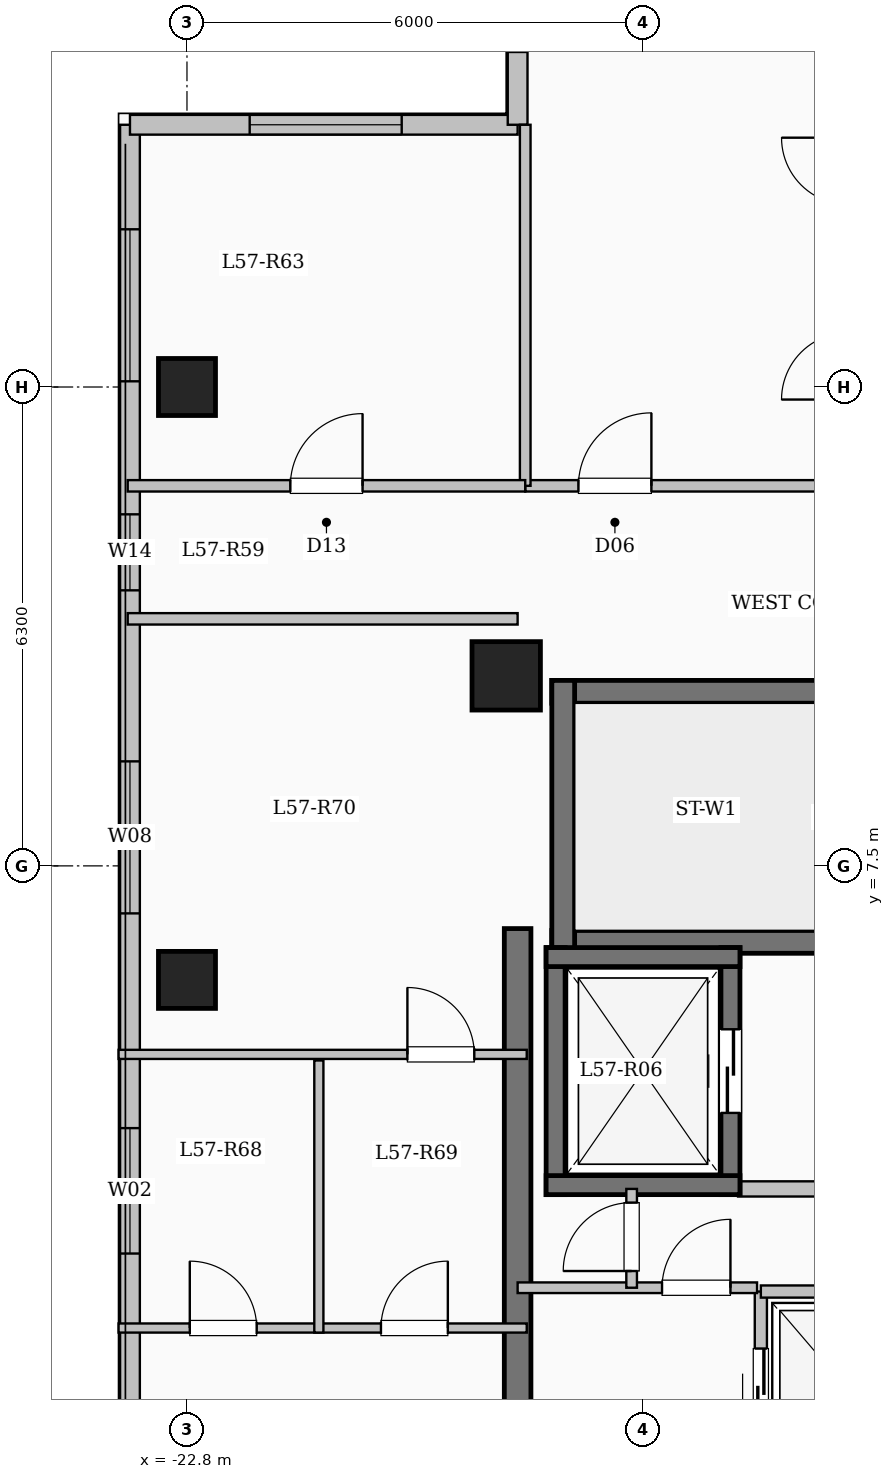
"""IFC4 building model, lengths in metres.
Left out: names, types, materials, properties, quantities, classifications, styles, units other than length and angle.
Written with IfcOpenShell. Run it as: python <this file> out.ifc"""

import sys

from ifc_helpers import new_model, si_unit, direction, frame, frame_2d, origin, origin_2d, place, context, subcontext, project, spatial, rectangle, extrude, element, fill, save


model = new_model("IFC4")
c1 = context("Model", 3, precision=1e-05, world=origin(), true_north=direction((0.0, 1.0)))
c2 = subcontext(c1, "Body", "Model", "MODEL_VIEW")
j1 = project(units=[si_unit("LENGTHUNIT", "METRE"), si_unit("PLANEANGLEUNIT", "RADIAN")], contexts=[c1])
p1 = place(None, origin())
s1 = spatial("IfcSite", under=j1, at=p1, CompositionType="ELEMENT")
p2 = place(p1, origin())
s2 = spatial("IfcBuilding", under=s1, at=p2, CompositionType="ELEMENT")
p3 = place(p2, frame((0.0, 0.0, 210.35)))
s3 = spatial("IfcBuildingStorey", under=s2, at=p3, CompositionType="ELEMENT", Elevation=210.35)
p4 = place(p3, frame((-18.6, 10.0, 0.0), z_axis=(0.0, 0.0, 1.0), x_axis=(1.0, 0.0, 0.0)))
e1 = element("IfcColumn", 1, at=p4, inside=s3, PredefinedType="COLUMN", context=c2, shape_type="SweptSolid", body=[
    extrude(rectangle(XDim=0.9, YDim=0.9, at=origin_2d()), origin(), (0.0, 0.0, 1.0), 3.35),
])
for number, where, z_axis, x_axis in (
    (2, (-22.8, 6.0, 0.0), (0.0, 0.0, 1.0), (1.0, 0.0, 0.0)),
    (3, (-22.8, 13.8, 0.0), (0.0, 0.0, 1.0), (1.0, 0.0, 0.0)),
):
    element("IfcColumn", number, at=place(p3, frame(where, z_axis=z_axis, x_axis=x_axis)), inside=s3, PredefinedType="COLUMN", context=c2, shape_type="SweptSolid", body=[
        extrude(rectangle(XDim=0.75, YDim=0.75, at=origin_2d()), origin(), (0.0, 0.0, 1.0), 3.35),
    ])
p5 = place(p3, frame((-23.55, -17.25, 0.0), z_axis=(0.0, 0.0, 1.0), x_axis=(0.0, 1.0, 0.0)))
e4 = element("IfcWall", 4, at=p5, inside=s3, PredefinedType="SOLIDWALL", context=c2, shape_type="SweptSolid", body=[
    extrude(rectangle(XDim=34.5, YDim=0.26, at=frame_2d((17.25, 0.0))), origin(), (0.0, 0.0, 1.0), 3.1),
])
p6 = place(p5, frame((2.825, 0.0, 0.9)))
e5 = element("IfcOpeningElement", 5, at=p6, cuts=e4, PredefinedType="OPENING", context=c2, shape_type="SweptSolid", body=[
    extrude(rectangle(XDim=2.2, YDim=1.75, at=frame_2d((1.1, 0.875))), frame((0.0, 0.14, 0.0), z_axis=(0.0, -1.0, 0.0), x_axis=(1.0, 0.0, 0.0)), (0.0, 0.0, 1.0), 0.28),
])
p7 = place(p5, frame((8.325, 0.0, 0.95)))
e6 = element("IfcOpeningElement", 6, at=p7, cuts=e4, PredefinedType="OPENING", context=c2, shape_type="SweptSolid", body=[
    extrude(rectangle(XDim=1.2, YDim=1.5, at=frame_2d((0.6, 0.75))), frame((0.0, 0.14, 0.0), z_axis=(0.0, -1.0, 0.0), x_axis=(1.0, 0.0, 0.0)), (0.0, 0.0, 1.0), 0.28),
])
p8 = place(p5, frame((13.25, 0.0, 0.9)))
e7 = element("IfcOpeningElement", 7, at=p8, cuts=e4, PredefinedType="OPENING", context=c2, shape_type="SweptSolid", body=[
    extrude(rectangle(XDim=2.2, YDim=1.75, at=frame_2d((1.1, 0.875))), frame((0.0, 0.14, 0.0), z_axis=(0.0, -1.0, 0.0), x_axis=(1.0, 0.0, 0.0)), (0.0, 0.0, 1.0), 0.28),
])
p9 = place(p5, frame((19.65, 0.0, 0.9)))
e8 = element("IfcOpeningElement", 8, at=p9, cuts=e4, PredefinedType="OPENING", context=c2, shape_type="SweptSolid", body=[
    extrude(rectangle(XDim=1.65, YDim=1.6, at=frame_2d((0.825, 0.8))), frame((0.0, 0.14, 0.0), z_axis=(0.0, -1.0, 0.0), x_axis=(1.0, 0.0, 0.0)), (0.0, 0.0, 1.0), 0.28),
])
p10 = place(p5, frame((24.125, 0.0, 0.9)))
e9 = element("IfcOpeningElement", 9, at=p10, cuts=e4, PredefinedType="OPENING", context=c2, shape_type="SweptSolid", body=[
    extrude(rectangle(XDim=2.0, YDim=1.7, at=frame_2d((1.0, 0.85))), frame((0.0, 0.14, 0.0), z_axis=(0.0, -1.0, 0.0), x_axis=(1.0, 0.0, 0.0)), (0.0, 0.0, 1.0), 0.28),
])
p11 = place(p5, frame((28.375, 0.0, 0.95)))
e10 = element("IfcOpeningElement", 10, at=p11, cuts=e4, PredefinedType="OPENING", context=c2, shape_type="SweptSolid", body=[
    extrude(rectangle(XDim=1.0, YDim=1.5, at=frame_2d((0.5, 0.75))), frame((0.0, 0.14, 0.0), z_axis=(0.0, -1.0, 0.0), x_axis=(1.0, 0.0, 0.0)), (0.0, 0.0, 1.0), 0.28),
])
p12 = place(p5, frame((31.125, 0.0, 0.9)))
e11 = element("IfcOpeningElement", 11, at=p12, cuts=e4, PredefinedType="OPENING", context=c2, shape_type="SweptSolid", body=[
    extrude(rectangle(XDim=2.0, YDim=1.7, at=frame_2d((1.0, 0.85))), frame((0.0, 0.14, 0.0), z_axis=(0.0, -1.0, 0.0), x_axis=(1.0, 0.0, 0.0)), (0.0, 0.0, 1.0), 0.28),
])
p13 = place(p3, frame((-23.55, 17.25, 0.0), z_axis=(0.0, 0.0, 1.0), x_axis=(1.0, 0.0, 0.0)))
e12 = element("IfcWall", 12, at=p13, inside=s3, PredefinedType="SOLIDWALL", context=c2, shape_type="SweptSolid", body=[
    extrude(rectangle(XDim=5.1, YDim=0.26, at=frame_2d((2.55, 0.0))), origin(), (0.0, 0.0, 1.0), 3.1),
])
p14 = place(p13, frame((1.575, 0.0, 0.9)))
e13 = element("IfcOpeningElement", 13, at=p14, cuts=e12, PredefinedType="OPENING", context=c2, shape_type="SweptSolid", body=[
    extrude(rectangle(XDim=2.0, YDim=1.7, at=frame_2d((1.0, 0.85))), frame((0.0, 0.14, 0.0), z_axis=(0.0, -1.0, 0.0), x_axis=(1.0, 0.0, 0.0)), (0.0, 0.0, 1.0), 0.28),
])
p15 = place(p3, frame((-18.45, 17.25, 0.0), z_axis=(0.0, 0.0, 1.0), x_axis=(0.0, 1.0, 0.0)))
e14 = element("IfcWall", 14, at=p15, inside=s3, PredefinedType="SOLIDWALL", context=c2, shape_type="SweptSolid", body=[
    extrude(rectangle(XDim=3.6, YDim=0.26, at=frame_2d((1.8, 0.0))), origin(), (0.0, 0.0, 1.0), 3.1),
])
p16 = place(p15, frame((0.958, 0.0, 0.9)))
e15 = element("IfcOpeningElement", 15, at=p16, cuts=e14, PredefinedType="OPENING", context=c2, shape_type="SweptSolid", body=[
    extrude(rectangle(XDim=1.65, YDim=1.6, at=frame_2d((0.825, 0.8))), frame((0.0, 0.14, 0.0), z_axis=(0.0, -1.0, 0.0), x_axis=(1.0, 0.0, 0.0)), (0.0, 0.0, 1.0), 0.28),
])
p17 = place(p3, frame((-18.0, 9.79, 0.0), z_axis=(0.0, 0.0, 1.0), x_axis=(1.0, 0.0, 0.0)))
e16 = element("IfcWall", 16, at=p17, inside=s3, PredefinedType="SHEAR", context=c2, shape_type="SweptSolid", body=[
    extrude(rectangle(XDim=8.0, YDim=0.3, at=frame_2d((4.0, 0.0))), origin(), (0.0, 0.0, 1.0), 3.35),
])
p18 = place(p3, frame((-18.0, 6.5, 0.0), z_axis=(0.0, 0.0, 1.0), x_axis=(1.0, 0.0, 0.0)))
e17 = element("IfcWall", 17, at=p18, inside=s3, PredefinedType="SHEAR", context=c2, shape_type="SweptSolid", body=[
    extrude(rectangle(XDim=8.0, YDim=0.3, at=frame_2d((4.0, 0.0))), origin(), (0.0, 0.0, 1.0), 3.35),
])
p19 = place(p18, frame((6.45, 0.0, 0.0)))
e18 = element("IfcOpeningElement", 18, at=p19, cuts=e17, PredefinedType="OPENING", context=c2, shape_type="SweptSolid", body=[
    extrude(rectangle(XDim=1.0, YDim=2.15, at=frame_2d((0.5, 1.075))), frame((0.0, 0.16, 0.0), z_axis=(0.0, -1.0, 0.0), x_axis=(1.0, 0.0, 0.0)), (0.0, 0.0, 1.0), 0.32),
])
p20 = place(p3, frame((-17.85, 6.35, 0.0), z_axis=(0.0, 0.0, 1.0), x_axis=(0.0, 1.0, 0.0)))
e19 = element("IfcWall", 19, at=p20, inside=s3, PredefinedType="SHEAR", context=c2, shape_type="SweptSolid", body=[
    extrude(rectangle(XDim=3.59, YDim=0.3, at=frame_2d((1.795, 0.0))), origin(), (0.0, 0.0, 1.0), 3.35),
])
p21 = place(p3, frame((-15.55, 3.25, 0.0), z_axis=(0.0, 0.0, 1.0), x_axis=(1.0, 0.0, 0.0)))
e20 = element("IfcWall", 20, at=p21, inside=s3, PredefinedType="SOLIDWALL", context=c2, shape_type="SweptSolid", body=[
    extrude(rectangle(XDim=5.4, YDim=0.2, at=frame_2d((2.7, 0.0))), origin(), (0.0, 0.0, 1.0), 3.1),
])
p22 = place(p3, frame((-17.95, 3.175, 0.0), z_axis=(0.0, 0.0, 1.0), x_axis=(0.0, 1.0, 0.0)))
e21 = element("IfcWall", 21, at=p22, inside=s3, PredefinedType="SHEAR", context=c2, shape_type="SweptSolid", body=[
    extrude(rectangle(XDim=3.25, YDim=0.25, at=frame_2d((1.625, 0.0))), origin(), (0.0, 0.0, 1.0), 3.35),
])
p23 = place(p3, frame((-15.65, 3.175, 0.0), z_axis=(0.0, 0.0, 1.0), x_axis=(0.0, 1.0, 0.0)))
e22 = element("IfcWall", 22, at=p23, inside=s3, PredefinedType="SHEAR", context=c2, shape_type="SweptSolid", body=[
    extrude(rectangle(XDim=3.25, YDim=0.25, at=frame_2d((1.625, 0.0))), origin(), (0.0, 0.0, 1.0), 3.35),
])
p24 = place(p23, frame((1.075, 0.0, 0.0)))
e23 = element("IfcOpeningElement", 23, at=p24, cuts=e22, PredefinedType="OPENING", context=c2, shape_type="SweptSolid", body=[
    extrude(rectangle(XDim=1.1, YDim=2.15, at=frame_2d((0.55, 1.075))), frame((0.0, 0.135, 0.0), z_axis=(0.0, -1.0, 0.0), x_axis=(1.0, 0.0, 0.0)), (0.0, 0.0, 1.0), 0.27),
])
for number, where, z_axis, x_axis in (
    (24, (-18.075, 3.3, 0.0), (0.0, 0.0, 1.0), (1.0, 0.0, 0.0)),
    (25, (-18.075, 6.3, 0.0), (0.0, 0.0, 1.0), (1.0, 0.0, 0.0)),
):
    element("IfcWall", number, at=place(p3, frame(where, z_axis=z_axis, x_axis=x_axis)), inside=s3, PredefinedType="SHEAR", context=c2, shape_type="SweptSolid", body=[
        extrude(rectangle(XDim=2.55, YDim=0.25, at=frame_2d((1.275, 0.0))), origin(), (0.0, 0.0, 1.0), 3.35),
    ])
p25 = place(p3, frame((-15.25, -0.7, 0.0), z_axis=(0.0, 0.0, 1.0), x_axis=(0.0, 1.0, 0.0)))
e26 = element("IfcWall", 26, at=p25, inside=s3, PredefinedType="SOLIDWALL", context=c2, shape_type="SweptSolid", body=[
    extrude(rectangle(XDim=2.6, YDim=0.16, at=frame_2d((1.3, 0.0))), origin(), (0.0, 0.0, 1.0), 3.1),
])
p26 = place(p25, frame((0.75, 0.0, 0.0)))
e27 = element("IfcOpeningElement", 27, at=p26, cuts=e26, PredefinedType="OPENING", context=c2, shape_type="SweptSolid", body=[
    extrude(rectangle(XDim=1.1, YDim=2.15, at=frame_2d((0.55, 1.075))), frame((0.0, 0.09, 0.0), z_axis=(0.0, -1.0, 0.0), x_axis=(1.0, 0.0, 0.0)), (0.0, 0.0, 1.0), 0.18),
])
p27 = place(p3, frame((-15.25, 1.9, 0.0), z_axis=(0.0, 0.0, 1.0), x_axis=(1.0, 0.0, 0.0)))
e28 = element("IfcWall", 28, at=p27, inside=s3, PredefinedType="SOLIDWALL", context=c2, shape_type="SweptSolid", body=[
    extrude(rectangle(XDim=2.3, YDim=0.16, at=frame_2d((1.15, 0.0))), origin(), (0.0, 0.0, 1.0), 3.1),
])
p28 = place(p3, frame((-18.45, -7.375, 0.0), z_axis=(0.0, 0.0, 1.0), x_axis=(0.0, 1.0, 0.0)))
e29 = element("IfcWall", 29, at=p28, inside=s3, PredefinedType="SHEAR", context=c2, shape_type="SweptSolid", body=[
    extrude(rectangle(XDim=14.05, YDim=0.35, at=frame_2d((7.025, 0.0))), origin(), (0.0, 0.0, 1.0), 3.35),
])
p29 = place(p3, frame((-18.45, 1.95, 0.0), z_axis=(0.0, 0.0, 1.0), x_axis=(1.0, 0.0, 0.0)))
e30 = element("IfcWall", 30, at=p29, inside=s3, PredefinedType="PARTITIONING", context=c2, shape_type="SweptSolid", body=[
    extrude(rectangle(XDim=3.15, YDim=0.14, at=frame_2d((1.575, 0.0))), origin(), (0.0, 0.0, 1.0), 3.1),
])
p30 = place(p29, frame((1.9, 0.0, 0.0)))
e31 = element("IfcOpeningElement", 31, at=p30, cuts=e30, PredefinedType="OPENING", context=c2, shape_type="SweptSolid", body=[
    extrude(rectangle(XDim=0.9, YDim=2.08, at=frame_2d((0.45, 1.04))), frame((0.0, 0.08, 0.0), z_axis=(0.0, -1.0, 0.0), x_axis=(1.0, 0.0, 0.0)), (0.0, 0.0, 1.0), 0.16),
])
p31 = place(p3, frame((-16.95, 1.95, 0.0), z_axis=(0.0, 0.0, 1.0), x_axis=(0.0, 1.0, 0.0)))
e32 = element("IfcWall", 32, at=p31, inside=s3, PredefinedType="PARTITIONING", context=c2, shape_type="SweptSolid", body=[
    extrude(rectangle(XDim=1.3, YDim=0.14, at=frame_2d((0.65, 0.0))), origin(), (0.0, 0.0, 1.0), 3.1),
])
p32 = place(p31, frame((0.22, 0.0, 0.0)))
e33 = element("IfcOpeningElement", 33, at=p32, cuts=e32, PredefinedType="OPENING", context=c2, shape_type="SweptSolid", body=[
    extrude(rectangle(XDim=0.9, YDim=2.08, at=frame_2d((0.45, 1.04))), frame((0.0, 0.08, 0.0), z_axis=(0.0, -1.0, 0.0), x_axis=(1.0, 0.0, 0.0)), (0.0, 0.0, 1.0), 0.16),
])
p33 = place(p3, frame((-18.35, 12.5, 0.0), z_axis=(0.0, 0.0, 1.0), x_axis=(1.0, 0.0, 0.0)))
e34 = element("IfcWall", 34, at=p33, inside=s3, PredefinedType="PARTITIONING", context=c2, shape_type="SweptSolid", body=[
    extrude(rectangle(XDim=14.5, YDim=0.15, at=frame_2d((7.25, 0.0))), origin(), (0.0, 0.0, 1.0), 3.1),
])
p34 = place(p33, frame((0.7, 0.0, 0.0)))
e35 = element("IfcOpeningElement", 35, at=p34, cuts=e34, PredefinedType="OPENING", context=c2, shape_type="SweptSolid", body=[
    extrude(rectangle(XDim=0.96, YDim=2.15, at=frame_2d((0.48, 1.075))), frame((0.0, 0.085, 0.0), z_axis=(0.0, -1.0, 0.0), x_axis=(1.0, 0.0, 0.0)), (0.0, 0.0, 1.0), 0.17),
])
p35 = place(p33, frame((9.205, 0.0, 0.0)))
e36 = element("IfcOpeningElement", 36, at=p35, cuts=e34, PredefinedType="OPENING", context=c2, shape_type="SweptSolid", body=[
    extrude(rectangle(XDim=0.96, YDim=2.15, at=frame_2d((0.48, 1.075))), frame((0.0, 0.085, 0.0), z_axis=(0.0, -1.0, 0.0), x_axis=(1.0, 0.0, 0.0)), (0.0, 0.0, 1.0), 0.17),
])
p36 = place(p3, frame((-23.58, 10.75, 0.0), z_axis=(0.0, 0.0, 1.0), x_axis=(1.0, 0.0, 0.0)))
e37 = element("IfcWall", 37, at=p36, inside=s3, PredefinedType="PARTITIONING", context=c2, shape_type="SweptSolid", body=[
    extrude(rectangle(XDim=5.13, YDim=0.15, at=frame_2d((2.565, 0.0))), origin(), (0.0, 0.0, 1.0), 3.1),
])
p37 = place(p3, frame((-18.35, 12.5, 0.0), z_axis=(0.0, 0.0, 1.0), x_axis=(0.0, 1.0, 0.0)))
e38 = element("IfcWall", 38, at=p37, inside=s3, PredefinedType="PARTITIONING", context=c2, shape_type="SweptSolid", body=[
    extrude(rectangle(XDim=4.75, YDim=0.14, at=frame_2d((2.375, 0.0))), origin(), (0.0, 0.0, 1.0), 3.1),
])
p38 = place(p3, frame((-23.58, 12.5, 0.0), z_axis=(0.0, 0.0, 1.0), x_axis=(1.0, 0.0, 0.0)))
e39 = element("IfcWall", 39, at=p38, inside=s3, PredefinedType="PARTITIONING", context=c2, shape_type="SweptSolid", body=[
    extrude(rectangle(XDim=5.23, YDim=0.15, at=frame_2d((2.615, 0.0))), origin(), (0.0, 0.0, 1.0), 3.1),
])
p39 = place(p38, frame((2.14, 0.0, 0.0)))
e40 = element("IfcOpeningElement", 40, at=p39, cuts=e39, PredefinedType="OPENING", context=c2, shape_type="SweptSolid", body=[
    extrude(rectangle(XDim=0.95, YDim=2.15, at=frame_2d((0.475, 1.075))), frame((0.0, 0.085, 0.0), z_axis=(0.0, -1.0, 0.0), x_axis=(1.0, 0.0, 0.0)), (0.0, 0.0, 1.0), 0.17),
])
p40 = place(p3, frame((-23.7, 1.42, 0.0), z_axis=(0.0, 0.0, 1.0), x_axis=(1.0, 0.0, 0.0)))
e41 = element("IfcWall", 41, at=p40, inside=s3, PredefinedType="PARTITIONING", context=c2, shape_type="SweptSolid", body=[
    extrude(rectangle(XDim=5.37, YDim=0.12, at=frame_2d((2.685, 0.0))), origin(), (0.0, 0.0, 1.0), 3.1),
])
p41 = place(p40, frame((0.937, 0.0, 0.0)))
e42 = element("IfcOpeningElement", 42, at=p41, cuts=e41, PredefinedType="OPENING", context=c2, shape_type="SweptSolid", body=[
    extrude(rectangle(XDim=0.88, YDim=2.1, at=frame_2d((0.44, 1.05))), frame((0.0, 0.07, 0.0), z_axis=(0.0, -1.0, 0.0), x_axis=(1.0, 0.0, 0.0)), (0.0, 0.0, 1.0), 0.14),
])
p42 = place(p40, frame((3.452, 0.0, 0.0)))
e43 = element("IfcOpeningElement", 43, at=p42, cuts=e41, PredefinedType="OPENING", context=c2, shape_type="SweptSolid", body=[
    extrude(rectangle(XDim=0.88, YDim=2.1, at=frame_2d((0.44, 1.05))), frame((0.0, 0.07, 0.0), z_axis=(0.0, -1.0, 0.0), x_axis=(1.0, 0.0, 0.0)), (0.0, 0.0, 1.0), 0.14),
])
p43 = place(p3, frame((-23.7, 5.02, 0.0), z_axis=(0.0, 0.0, 1.0), x_axis=(1.0, 0.0, 0.0)))
e44 = element("IfcWall", 44, at=p43, inside=s3, PredefinedType="PARTITIONING", context=c2, shape_type="SweptSolid", body=[
    extrude(rectangle(XDim=5.37, YDim=0.12, at=frame_2d((2.685, 0.0))), origin(), (0.0, 0.0, 1.0), 3.1),
])
p44 = place(p43, frame((3.8, 0.0, 0.0)))
e45 = element("IfcOpeningElement", 45, at=p44, cuts=e44, PredefinedType="OPENING", context=c2, shape_type="SweptSolid", body=[
    extrude(rectangle(XDim=0.88, YDim=2.1, at=frame_2d((0.44, 1.05))), frame((0.0, 0.07, 0.0), z_axis=(0.0, -1.0, 0.0), x_axis=(1.0, 0.0, 0.0)), (0.0, 0.0, 1.0), 0.14),
])
p45 = place(p3, frame((-21.065, 1.36, 0.0), z_axis=(0.0, 0.0, 1.0), x_axis=(0.0, 1.0, 0.0)))
e46 = element("IfcWall", 46, at=p45, inside=s3, PredefinedType="PARTITIONING", context=c2, shape_type="SweptSolid", body=[
    extrude(rectangle(XDim=3.58, YDim=0.12, at=frame_2d((1.79, 0.0))), origin(), (0.0, 0.0, 1.0), 3.1),
])
p46 = place(p9, origin())
e47 = element("IfcWindow", 47, at=p46, inside=s3, PartitioningType="SINGLE_PANEL", PredefinedType="WINDOW", context=c2, shape_type="SweptSolid", body=[
    extrude(rectangle(XDim=1.65, YDim=1.6, at=frame_2d((0.825, 0.8))), frame((0.0, 0.03, 0.0), z_axis=(0.0, -1.0, 0.0), x_axis=(1.0, 0.0, 0.0)), (0.0, 0.0, 1.0), 0.06),
])
fill(e8, e47)
p47 = place(p10, origin())
e48 = element("IfcWindow", 48, at=p47, inside=s3, PartitioningType="SINGLE_PANEL", PredefinedType="WINDOW", context=c2, shape_type="SweptSolid", body=[
    extrude(rectangle(XDim=2.0, YDim=1.7, at=frame_2d((1.0, 0.85))), frame((0.0, 0.03, 0.0), z_axis=(0.0, -1.0, 0.0), x_axis=(1.0, 0.0, 0.0)), (0.0, 0.0, 1.0), 0.06),
])
fill(e9, e48)
p48 = place(p11, origin())
e49 = element("IfcWindow", 49, at=p48, inside=s3, PartitioningType="SINGLE_PANEL", PredefinedType="WINDOW", context=c2, shape_type="SweptSolid", body=[
    extrude(rectangle(XDim=1.0, YDim=1.5, at=frame_2d((0.5, 0.75))), frame((0.0, 0.03, 0.0), z_axis=(0.0, -1.0, 0.0), x_axis=(1.0, 0.0, 0.0)), (0.0, 0.0, 1.0), 0.06),
])
fill(e10, e49)
p49 = place(p12, origin())
e50 = element("IfcWindow", 50, at=p49, inside=s3, PartitioningType="SINGLE_PANEL", PredefinedType="WINDOW", context=c2, shape_type="SweptSolid", body=[
    extrude(rectangle(XDim=2.0, YDim=1.7, at=frame_2d((1.0, 0.85))), frame((0.0, 0.03, 0.0), z_axis=(0.0, -1.0, 0.0), x_axis=(1.0, 0.0, 0.0)), (0.0, 0.0, 1.0), 0.06),
])
fill(e11, e50)
p50 = place(p14, origin())
e51 = element("IfcWindow", 51, at=p50, inside=s3, PartitioningType="SINGLE_PANEL", PredefinedType="WINDOW", context=c2, shape_type="SweptSolid", body=[
    extrude(rectangle(XDim=2.0, YDim=1.7, at=frame_2d((1.0, 0.85))), frame((0.0, 0.03, 0.0), z_axis=(0.0, -1.0, 0.0), x_axis=(1.0, 0.0, 0.0)), (0.0, 0.0, 1.0), 0.06),
])
fill(e13, e51)
p51 = place(p24, origin())
e52 = element("IfcDoor", 52, at=p51, inside=s3, OperationType="SLIDING_TO_LEFT", PredefinedType="DOOR", context=c2, shape_type="SweptSolid", body=[
    extrude(rectangle(XDim=1.1, YDim=2.15, at=frame_2d((0.55, 1.075))), frame((0.0, 0.025, 0.0), z_axis=(0.0, -1.0, 0.0), x_axis=(1.0, 0.0, 0.0)), (0.0, 0.0, 1.0), 0.05),
])
fill(e23, e52)
p52 = place(p26, origin())
e53 = element("IfcDoor", 53, at=p52, inside=s3, OperationType="SLIDING_TO_LEFT", PredefinedType="DOOR", context=c2, shape_type="SweptSolid", body=[
    extrude(rectangle(XDim=1.1, YDim=2.15, at=frame_2d((0.55, 1.075))), frame((0.0, 0.025, 0.0), z_axis=(0.0, -1.0, 0.0), x_axis=(1.0, 0.0, 0.0)), (0.0, 0.0, 1.0), 0.05),
])
fill(e27, e53)
p53 = place(p30, origin())
e54 = element("IfcDoor", 54, at=p53, inside=s3, OperationType="SINGLE_SWING_RIGHT", PredefinedType="DOOR", context=c2, shape_type="SweptSolid", body=[
    extrude(rectangle(XDim=0.9, YDim=2.08, at=frame_2d((0.45, 1.04))), frame((0.0, 0.025, 0.0), z_axis=(0.0, -1.0, 0.0), x_axis=(1.0, 0.0, 0.0)), (0.0, 0.0, 1.0), 0.05),
])
fill(e31, e54)
p54 = place(p32, origin())
e55 = element("IfcDoor", 55, at=p54, inside=s3, OperationType="SINGLE_SWING_LEFT", PredefinedType="DOOR", context=c2, shape_type="SweptSolid", body=[
    extrude(rectangle(XDim=0.9, YDim=2.08, at=frame_2d((0.45, 1.04))), frame((0.0, 0.025, 0.0), z_axis=(0.0, -1.0, 0.0), x_axis=(1.0, 0.0, 0.0)), (0.0, 0.0, 1.0), 0.05),
])
fill(e33, e55)
p55 = place(p34, origin())
e56 = element("IfcDoor", 56, at=p55, inside=s3, OperationType="SINGLE_SWING_RIGHT", PredefinedType="DOOR", context=c2, shape_type="SweptSolid", body=[
    extrude(rectangle(XDim=0.96, YDim=2.15, at=frame_2d((0.48, 1.075))), frame((0.0, 0.025, 0.0), z_axis=(0.0, -1.0, 0.0), x_axis=(1.0, 0.0, 0.0)), (0.0, 0.0, 1.0), 0.05),
])
fill(e35, e56)
p56 = place(p39, origin())
e57 = element("IfcDoor", 57, at=p56, inside=s3, OperationType="SINGLE_SWING_RIGHT", PredefinedType="DOOR", context=c2, shape_type="SweptSolid", body=[
    extrude(rectangle(XDim=0.95, YDim=2.15, at=frame_2d((0.475, 1.075))), frame((0.0, 0.025, 0.0), z_axis=(0.0, -1.0, 0.0), x_axis=(1.0, 0.0, 0.0)), (0.0, 0.0, 1.0), 0.05),
])
fill(e40, e57)
p57 = place(p41, origin())
e58 = element("IfcDoor", 58, at=p57, inside=s3, OperationType="SINGLE_SWING_LEFT", PredefinedType="DOOR", context=c2, shape_type="SweptSolid", body=[
    extrude(rectangle(XDim=0.88, YDim=2.1, at=frame_2d((0.44, 1.05))), frame((0.0, 0.025, 0.0), z_axis=(0.0, -1.0, 0.0), x_axis=(1.0, 0.0, 0.0)), (0.0, 0.0, 1.0), 0.05),
])
fill(e42, e58)
p58 = place(p42, origin())
e59 = element("IfcDoor", 59, at=p58, inside=s3, OperationType="SINGLE_SWING_RIGHT", PredefinedType="DOOR", context=c2, shape_type="SweptSolid", body=[
    extrude(rectangle(XDim=0.88, YDim=2.1, at=frame_2d((0.44, 1.05))), frame((0.0, 0.025, 0.0), z_axis=(0.0, -1.0, 0.0), x_axis=(1.0, 0.0, 0.0)), (0.0, 0.0, 1.0), 0.05),
])
fill(e43, e59)
p59 = place(p44, origin())
e60 = element("IfcDoor", 60, at=p59, inside=s3, OperationType="SINGLE_SWING_LEFT", PredefinedType="DOOR", context=c2, shape_type="SweptSolid", body=[
    extrude(rectangle(XDim=0.88, YDim=2.1, at=frame_2d((0.44, 1.05))), frame((0.0, 0.025, 0.0), z_axis=(0.0, -1.0, 0.0), x_axis=(1.0, 0.0, 0.0)), (0.0, 0.0, 1.0), 0.05),
])
fill(e45, e60)
save(model, sys.argv[1])
